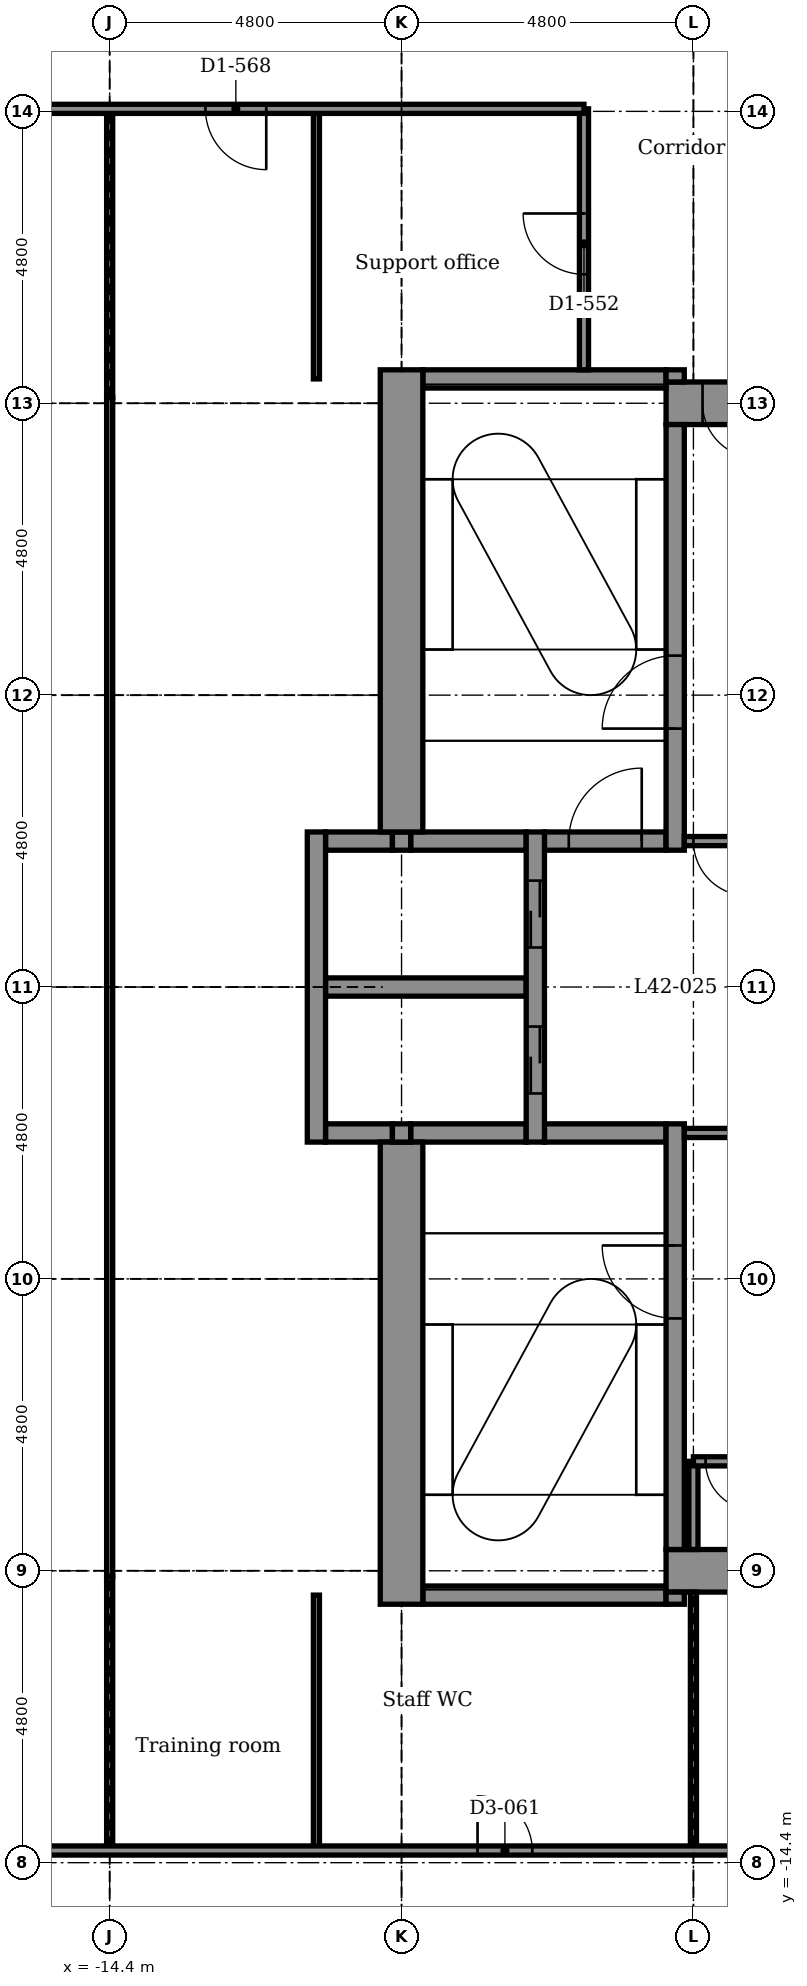
"""IFC4 building model, lengths in metres.
Left out: names, types, materials, properties, quantities, classifications, styles, units other than length and angle.
Written with IfcOpenShell. Run it as: python <this file> out.ifc"""

import sys

from ifc_helpers import new_model, si_unit, direction, frame, frame_2d, origin, place, context, subcontext, project, spatial, rectangle, extrude, element, fill, save


model = new_model("IFC4")
c1 = context("Model", 3, precision=1e-05, world=origin(), true_north=direction((0.0, 1.0)))
c2 = subcontext(c1, "Body", "Model", "MODEL_VIEW")
j1 = project(units=[si_unit("LENGTHUNIT", "METRE"), si_unit("PLANEANGLEUNIT", "RADIAN")], contexts=[c1])
p1 = place(None, origin())
s1 = spatial("IfcSite", under=j1, at=p1, CompositionType="ELEMENT")
p2 = place(p1, origin())
s2 = spatial("IfcBuilding", under=s1, at=p2, CompositionType="ELEMENT")
p3 = place(p2, frame((0.0, 0.0, 197.3)))
s3 = spatial("IfcBuildingStorey", under=s2, at=p3, CompositionType="ELEMENT", Elevation=197.3)
p4 = place(p3, frame((-9.25, -10.0, -0.15), z_axis=(0.0, 0.0, 1.0), x_axis=(1.0, 0.0, 0.0)))
e1 = element("IfcWall", 1, at=p4, inside=s3, PredefinedType="STANDARD", context=c2, shape_type="SweptSolid", body=[
    extrude(rectangle(XDim=4.0, YDim=0.3, at=frame_2d((2.0, 0.0))), origin(), (0.0, 0.0, 1.0), 3.9),
])
p5 = place(p3, frame((-5.25, -9.6, -0.15), z_axis=(0.0, 0.0, 1.0), x_axis=(1.0, 0.0, 0.0)))
e2 = element("IfcWall", 2, at=p5, inside=s3, PredefinedType="SHEAR", context=c2, shape_type="SweptSolid", body=[
    extrude(rectangle(XDim=10.2, YDim=0.7, at=frame_2d((5.1, 0.0))), origin(), (0.0, 0.0, 1.0), 3.9),
])
p6 = place(p5, frame((9.0, 0.0, 0.15)))
e3 = element("IfcOpeningElement", 3, at=p6, cuts=e2, PredefinedType="OPENING", context=c2, shape_type="SweptSolid", body=[
    extrude(rectangle(XDim=0.9, YDim=2.1, at=frame_2d((0.45, 1.05))), frame((0.0, 0.36, 0.0), z_axis=(0.0, -1.0, 0.0), x_axis=(1.0, 0.0, 0.0)), (0.0, 0.0, 1.0), 0.72),
])
p7 = place(p3, frame((-10.85, -2.4, -0.15), z_axis=(0.0, 0.0, 1.0), x_axis=(1.0, 0.0, 0.0)))
e4 = element("IfcWall", 4, at=p7, inside=s3, PredefinedType="STANDARD", context=c2, shape_type="SweptSolid", body=[
    extrude(rectangle(XDim=1.1, YDim=0.3, at=frame_2d((0.55, 0.0))), origin(), (0.0, 0.0, 1.0), 3.9),
])
p8 = place(p3, frame((-9.45, -2.4, -0.15), z_axis=(0.0, 0.0, 1.0), x_axis=(1.0, 0.0, 0.0)))
e5 = element("IfcWall", 5, at=p8, inside=s3, PredefinedType="STANDARD", context=c2, shape_type="SweptSolid", body=[
    extrude(rectangle(XDim=1.9, YDim=0.3, at=frame_2d((0.95, 0.0))), origin(), (0.0, 0.0, 1.0), 3.9),
])
p9 = place(p3, frame((-7.25, -2.4, -0.15), z_axis=(0.0, 0.0, 1.0), x_axis=(1.0, 0.0, 0.0)))
e6 = element("IfcWall", 6, at=p9, inside=s3, PredefinedType="STANDARD", context=c2, shape_type="SweptSolid", body=[
    extrude(rectangle(XDim=2.0, YDim=0.3, at=frame_2d((1.0, 0.0))), origin(), (0.0, 0.0, 1.0), 3.9),
])
p10 = place(p3, frame((-10.85, 0.0, -0.15), z_axis=(0.0, 0.0, 1.0), x_axis=(1.0, 0.0, 0.0)))
e7 = element("IfcWall", 7, at=p10, inside=s3, PredefinedType="STANDARD", context=c2, shape_type="SweptSolid", body=[
    extrude(rectangle(XDim=3.3, YDim=0.3, at=frame_2d((1.65, 0.0))), origin(), (0.0, 0.0, 1.0), 3.9),
])
p11 = place(p3, frame((-10.85, 2.4, -0.15), z_axis=(0.0, 0.0, 1.0), x_axis=(1.0, 0.0, 0.0)))
e8 = element("IfcWall", 8, at=p11, inside=s3, PredefinedType="STANDARD", context=c2, shape_type="SweptSolid", body=[
    extrude(rectangle(XDim=1.1, YDim=0.3, at=frame_2d((0.55, 0.0))), origin(), (0.0, 0.0, 1.0), 3.9),
])
p12 = place(p3, frame((-9.45, 2.4, -0.15), z_axis=(0.0, 0.0, 1.0), x_axis=(1.0, 0.0, 0.0)))
e9 = element("IfcWall", 9, at=p12, inside=s3, PredefinedType="STANDARD", context=c2, shape_type="SweptSolid", body=[
    extrude(rectangle(XDim=1.9, YDim=0.3, at=frame_2d((0.95, 0.0))), origin(), (0.0, 0.0, 1.0), 3.9),
])
p13 = place(p3, frame((-7.25, 2.4, -0.15), z_axis=(0.0, 0.0, 1.0), x_axis=(1.0, 0.0, 0.0)))
e10 = element("IfcWall", 10, at=p13, inside=s3, PredefinedType="STANDARD", context=c2, shape_type="SweptSolid", body=[
    extrude(rectangle(XDim=2.0, YDim=0.3, at=frame_2d((1.0, 0.0))), origin(), (0.0, 0.0, 1.0), 3.9),
])
p14 = place(p13, frame((0.4, 0.0, 0.15)))
e11 = element("IfcOpeningElement", 11, at=p14, cuts=e10, PredefinedType="OPENING", context=c2, shape_type="SweptSolid", body=[
    extrude(rectangle(XDim=1.2, YDim=2.1, at=frame_2d((0.6, 1.05))), frame((0.0, 0.16, 0.0), z_axis=(0.0, -1.0, 0.0), x_axis=(1.0, 0.0, 0.0)), (0.0, 0.0, 1.0), 0.32),
])
p15 = place(p3, frame((-5.25, 9.6, -0.15), z_axis=(0.0, 0.0, 1.0), x_axis=(1.0, 0.0, 0.0)))
e12 = element("IfcWall", 12, at=p15, inside=s3, PredefinedType="SHEAR", context=c2, shape_type="SweptSolid", body=[
    extrude(rectangle(XDim=14.5, YDim=0.7, at=frame_2d((7.25, 0.0))), origin(), (0.0, 0.0, 1.0), 3.9),
])
p16 = place(p15, frame((0.6, 0.0, 0.15)))
e13 = element("IfcOpeningElement", 13, at=p16, cuts=e12, PredefinedType="OPENING", context=c2, shape_type="SweptSolid", body=[
    extrude(rectangle(XDim=0.9, YDim=2.1, at=frame_2d((0.45, 1.05))), frame((0.0, 0.36, 0.0), z_axis=(0.0, -1.0, 0.0), x_axis=(1.0, 0.0, 0.0)), (0.0, 0.0, 1.0), 0.72),
])
p17 = place(p3, frame((-9.25, 10.0, -0.15), z_axis=(0.0, 0.0, 1.0), x_axis=(1.0, 0.0, 0.0)))
e14 = element("IfcWall", 14, at=p17, inside=s3, PredefinedType="STANDARD", context=c2, shape_type="SweptSolid", body=[
    extrude(rectangle(XDim=4.0, YDim=0.3, at=frame_2d((2.0, 0.0))), origin(), (0.0, 0.0, 1.0), 3.9),
])
p18 = place(p3, frame((-11.0, -2.55, -0.15), z_axis=(0.0, 0.0, 1.0), x_axis=(0.0, 1.0, 0.0)))
e15 = element("IfcWall", 15, at=p18, inside=s3, PredefinedType="STANDARD", context=c2, shape_type="SweptSolid", body=[
    extrude(rectangle(XDim=5.1, YDim=0.3, at=frame_2d((2.55, 0.0))), origin(), (0.0, 0.0, 1.0), 3.9),
])
p19 = place(p3, frame((-9.6, -10.15, -0.15), z_axis=(0.0, 0.0, 1.0), x_axis=(0.0, 1.0, 0.0)))
e16 = element("IfcWall", 16, at=p19, inside=s3, PredefinedType="SHEAR", context=c2, shape_type="SweptSolid", body=[
    extrude(rectangle(XDim=7.6, YDim=0.7, at=frame_2d((3.8, 0.0))), origin(), (0.0, 0.0, 1.0), 3.9),
])
for number, where, z_axis, x_axis in (
    (17, (-9.6, -2.55, -0.15), (0.0, 0.0, 1.0), (0.0, 1.0, 0.0)),
    (18, (-9.6, 2.25, -0.15), (0.0, 0.0, 1.0), (0.0, 1.0, 0.0)),
):
    element("IfcWall", number, at=place(p3, frame(where, z_axis=z_axis, x_axis=x_axis)), inside=s3, PredefinedType="STANDARD", context=c2, shape_type="SweptSolid", body=[
        extrude(rectangle(XDim=0.3, YDim=0.3, at=frame_2d((0.15, 0.0))), origin(), (0.0, 0.0, 1.0), 3.9),
    ])
p20 = place(p3, frame((-9.6, 2.55, -0.15), z_axis=(0.0, 0.0, 1.0), x_axis=(0.0, 1.0, 0.0)))
e19 = element("IfcWall", 19, at=p20, inside=s3, PredefinedType="SHEAR", context=c2, shape_type="SweptSolid", body=[
    extrude(rectangle(XDim=7.6, YDim=0.7, at=frame_2d((3.8, 0.0))), origin(), (0.0, 0.0, 1.0), 3.9),
])
p21 = place(p3, frame((-7.4, -2.55, -0.15), z_axis=(0.0, 0.0, 1.0), x_axis=(0.0, 1.0, 0.0)))
e20 = element("IfcWall", 20, at=p21, inside=s3, PredefinedType="STANDARD", context=c2, shape_type="SweptSolid", body=[
    extrude(rectangle(XDim=5.1, YDim=0.3, at=frame_2d((2.55, 0.0))), origin(), (0.0, 0.0, 1.0), 3.9),
])
p22 = place(p21, frame((0.8, 0.0, 0.15)))
e21 = element("IfcOpeningElement", 21, at=p22, cuts=e20, PredefinedType="OPENING", context=c2, shape_type="SweptSolid", body=[
    extrude(rectangle(XDim=1.1, YDim=2.1, at=frame_2d((0.55, 1.05))), frame((0.0, 0.16, 0.0), z_axis=(0.0, -1.0, 0.0), x_axis=(1.0, 0.0, 0.0)), (0.0, 0.0, 1.0), 0.32),
])
p23 = place(p21, frame((3.2, 0.0, 0.15)))
e22 = element("IfcOpeningElement", 22, at=p23, cuts=e20, PredefinedType="OPENING", context=c2, shape_type="SweptSolid", body=[
    extrude(rectangle(XDim=1.1, YDim=2.1, at=frame_2d((0.55, 1.05))), frame((0.0, 0.16, 0.0), z_axis=(0.0, -1.0, 0.0), x_axis=(1.0, 0.0, 0.0)), (0.0, 0.0, 1.0), 0.32),
])
p24 = place(p3, frame((-5.1, -10.15, -0.15), z_axis=(0.0, 0.0, 1.0), x_axis=(0.0, 1.0, 0.0)))
e23 = element("IfcWall", 23, at=p24, inside=s3, PredefinedType="STANDARD", context=c2, shape_type="SweptSolid", body=[
    extrude(rectangle(XDim=0.2, YDim=0.3, at=frame_2d((0.1, 0.0))), origin(), (0.0, 0.0, 1.0), 3.9),
])
p25 = place(p3, frame((-5.1, -9.25, -0.15), z_axis=(0.0, 0.0, 1.0), x_axis=(0.0, 1.0, 0.0)))
e24 = element("IfcWall", 24, at=p25, inside=s3, PredefinedType="STANDARD", context=c2, shape_type="SweptSolid", body=[
    extrude(rectangle(XDim=7.0, YDim=0.3, at=frame_2d((3.5, 0.0))), origin(), (0.0, 0.0, 1.0), 3.9),
])
p26 = place(p25, frame((3.8, 0.0, 0.15)))
e25 = element("IfcOpeningElement", 25, at=p26, cuts=e24, PredefinedType="OPENING", context=c2, shape_type="SweptSolid", body=[
    extrude(rectangle(XDim=1.2, YDim=2.1, at=frame_2d((0.6, 1.05))), frame((0.0, 0.16, 0.0), z_axis=(0.0, -1.0, 0.0), x_axis=(1.0, 0.0, 0.0)), (0.0, 0.0, 1.0), 0.32),
])
p27 = place(p3, frame((-5.1, 2.25, -0.15), z_axis=(0.0, 0.0, 1.0), x_axis=(0.0, 1.0, 0.0)))
e26 = element("IfcWall", 26, at=p27, inside=s3, PredefinedType="STANDARD", context=c2, shape_type="SweptSolid", body=[
    extrude(rectangle(XDim=7.0, YDim=0.3, at=frame_2d((3.5, 0.0))), origin(), (0.0, 0.0, 1.0), 3.9),
])
p28 = place(p27, frame((2.0, 0.0, 0.15)))
e27 = element("IfcOpeningElement", 27, at=p28, cuts=e26, PredefinedType="OPENING", context=c2, shape_type="SweptSolid", body=[
    extrude(rectangle(XDim=1.2, YDim=2.1, at=frame_2d((0.6, 1.05))), frame((0.0, 0.16, 0.0), z_axis=(0.0, -1.0, 0.0), x_axis=(1.0, 0.0, 0.0)), (0.0, 0.0, 1.0), 0.32),
])
p29 = place(p3, frame((-5.1, 9.95, -0.15), z_axis=(0.0, 0.0, 1.0), x_axis=(0.0, 1.0, 0.0)))
e28 = element("IfcWall", 28, at=p29, inside=s3, PredefinedType="STANDARD", context=c2, shape_type="SweptSolid", body=[
    extrude(rectangle(XDim=0.2, YDim=0.3, at=frame_2d((0.1, 0.0))), origin(), (0.0, 0.0, 1.0), 3.9),
])
p30 = place(p3, frame((-4.8, -14.2, 0.0), z_axis=(0.0, 0.0, 1.0), x_axis=(0.0, 1.0, 0.0)))
e29 = element("IfcWall", 29, at=p30, inside=s3, PredefinedType="PARTITIONING", context=c2, shape_type="SweptSolid", body=[
    extrude(rectangle(XDim=4.25, YDim=0.1, at=frame_2d((2.125, 0.0))), origin(), (0.0, 0.0, 1.0), 3.066),
])
p31 = place(p3, frame((-4.8, -9.25, 0.0), z_axis=(0.0, 0.0, 1.0), x_axis=(0.0, 1.0, 0.0)))
e30 = element("IfcWall", 30, at=p31, inside=s3, PredefinedType="PARTITIONING", context=c2, shape_type="SweptSolid", body=[
    extrude(rectangle(XDim=1.45, YDim=0.15, at=frame_2d((0.725, 0.0))), origin(), (0.0, 0.0, 1.0), 3.75),
])
p32 = place(p3, frame((-6.6, 10.15, 0.0), z_axis=(0.0, 0.0, 1.0), x_axis=(0.0, 1.0, 0.0)))
e31 = element("IfcWall", 31, at=p32, inside=s3, PredefinedType="PARTITIONING", context=c2, shape_type="SweptSolid", body=[
    extrude(rectangle(XDim=4.292, YDim=0.15, at=frame_2d((2.146, 0.0))), origin(), (0.0, 0.0, 1.0), 3.75),
])
p33 = place(p32, frame((1.571, 0.0, 0.0)))
e32 = element("IfcOpeningElement", 32, at=p33, cuts=e31, PredefinedType="OPENING", context=c2, shape_type="SweptSolid", body=[
    extrude(rectangle(XDim=1.0, YDim=2.1, at=frame_2d((0.5, 1.05))), frame((0.0, 0.085, 0.0), z_axis=(0.0, -1.0, 0.0), x_axis=(1.0, 0.0, 0.0)), (0.0, 0.0, 1.0), 0.17),
])
p34 = place(p3, frame((-11.0, -14.2, 0.0), z_axis=(0.0, 0.0, 1.0), x_axis=(0.0, 1.0, 0.0)))
e33 = element("IfcWall", 33, at=p34, inside=s3, PredefinedType="PARTITIONING", context=c2, shape_type="SweptSolid", body=[
    extrude(rectangle(XDim=4.2, YDim=0.1, at=frame_2d((2.1, 0.0))), origin(), (0.0, 0.0, 1.0), 3.75),
])
p35 = place(p3, frame((-11.0, 10.0, 0.0), z_axis=(0.0, 0.0, 1.0), x_axis=(0.0, 1.0, 0.0)))
e34 = element("IfcWall", 34, at=p35, inside=s3, PredefinedType="PARTITIONING", context=c2, shape_type="SweptSolid", body=[
    extrude(rectangle(XDim=4.441, YDim=0.1, at=frame_2d((2.221, 0.0))), origin(), (0.0, 0.0, 1.0), 3.75),
])
p36 = place(p3, frame((-14.4, -9.694, 0.0), z_axis=(0.0, 0.0, 1.0), x_axis=(0.0, 1.0, 0.0)))
e35 = element("IfcWall", 35, at=p36, inside=s3, PredefinedType="PARTITIONING", context=c2, shape_type="SweptSolid", body=[
    extrude(rectangle(XDim=19.387, YDim=0.1, at=frame_2d((9.694, 0.0))), origin(), (0.0, 0.0, 1.0), 3.75),
])
p37 = place(p3, frame((-14.4, -14.2, 0.0), z_axis=(0.0, 0.0, 1.0), x_axis=(0.0, 1.0, 0.0)))
e36 = element("IfcWall", 36, at=p37, inside=s3, PredefinedType="PARTITIONING", context=c2, shape_type="SweptSolid", body=[
    extrude(rectangle(XDim=4.506, YDim=0.1, at=frame_2d((2.253, 0.0))), origin(), (0.0, 0.0, 1.0), 3.066),
])
p38 = place(p3, frame((-14.4, 9.694, 0.0), z_axis=(0.0, 0.0, 1.0), x_axis=(0.0, 1.0, 0.0)))
e37 = element("IfcWall", 37, at=p38, inside=s3, PredefinedType="PARTITIONING", context=c2, shape_type="SweptSolid", body=[
    extrude(rectangle(XDim=4.748, YDim=0.1, at=frame_2d((2.374, 0.0))), origin(), (0.0, 0.0, 1.0), 3.066),
])
p39 = place(p3, frame((-16.93, -14.2, 0.0), z_axis=(0.0, 0.0, 1.0), x_axis=(1.0, 0.0, 0.0)))
e38 = element("IfcWall", 38, at=p39, inside=s3, PredefinedType="PARTITIONING", context=c2, shape_type="SweptSolid", body=[
    extrude(rectangle(XDim=19.93, YDim=0.15, at=frame_2d((9.965, 0.0))), origin(), (0.0, 0.0, 1.0), 3.75),
])
p40 = place(p39, frame((8.58, 0.0, 0.0)))
e39 = element("IfcOpeningElement", 39, at=p40, cuts=e38, PredefinedType="OPENING", context=c2, shape_type="SweptSolid", body=[
    extrude(rectangle(XDim=0.9, YDim=2.1, at=frame_2d((0.45, 1.05))), frame((0.0, 0.085, 0.0), z_axis=(0.0, -1.0, 0.0), x_axis=(1.0, 0.0, 0.0)), (0.0, 0.0, 1.0), 0.17),
])
p41 = place(p39, frame((14.08, 0.0, 0.0)))
e40 = element("IfcOpeningElement", 40, at=p41, cuts=e38, PredefinedType="OPENING", context=c2, shape_type="SweptSolid", body=[
    extrude(rectangle(XDim=0.9, YDim=2.1, at=frame_2d((0.45, 1.05))), frame((0.0, 0.085, 0.0), z_axis=(0.0, -1.0, 0.0), x_axis=(1.0, 0.0, 0.0)), (0.0, 0.0, 1.0), 0.17),
])
p42 = place(p3, frame((-4.8, -7.8, 0.0), z_axis=(0.0, 0.0, 1.0), x_axis=(1.0, 0.0, 0.0)))
e41 = element("IfcWall", 41, at=p42, inside=s3, PredefinedType="PARTITIONING", context=c2, shape_type="SweptSolid", body=[
    extrude(rectangle(XDim=1.05, YDim=0.15, at=frame_2d((0.525, 0.0))), origin(), (0.0, 0.0, 1.0), 3.75),
])
p43 = place(p42, frame((0.2, 0.0, 0.0)))
e42 = element("IfcOpeningElement", 42, at=p43, cuts=e41, PredefinedType="OPENING", context=c2, shape_type="SweptSolid", body=[
    extrude(rectangle(XDim=0.8, YDim=2.1, at=frame_2d((0.4, 1.05))), frame((0.0, 0.085, 0.0), z_axis=(0.0, -1.0, 0.0), x_axis=(1.0, 0.0, 0.0)), (0.0, 0.0, 1.0), 0.17),
])
p44 = place(p3, frame((-18.592, 14.441, 0.0), z_axis=(0.0, 0.0, 1.0), x_axis=(1.0, 0.0, 0.0)))
e43 = element("IfcWall", 43, at=p44, inside=s3, PredefinedType="PARTITIONING", context=c2, shape_type="SweptSolid", body=[
    extrude(rectangle(XDim=11.991, YDim=0.15, at=frame_2d((5.996, 0.0))), origin(), (0.0, 0.0, 1.0), 3.75),
])
p45 = place(p44, frame((5.767, 0.0, 0.0)))
e44 = element("IfcOpeningElement", 44, at=p45, cuts=e43, PredefinedType="OPENING", context=c2, shape_type="SweptSolid", body=[
    extrude(rectangle(XDim=1.0, YDim=2.1, at=frame_2d((0.5, 1.05))), frame((0.0, 0.085, 0.0), z_axis=(0.0, -1.0, 0.0), x_axis=(1.0, 0.0, 0.0)), (0.0, 0.0, 1.0), 0.17),
])
p46 = place(p3, frame((-4.95, 2.4, 0.0), z_axis=(0.0, 0.0, 1.0), x_axis=(1.0, 0.0, 0.0)))
e45 = element("IfcWall", 45, at=p46, inside=s3, PredefinedType="PARTITIONING", context=c2, shape_type="SweptSolid", body=[
    extrude(rectangle(XDim=1.2, YDim=0.15, at=frame_2d((0.6, 0.0))), origin(), (0.0, 0.0, 1.0), 3.75),
])
p47 = place(p46, frame((0.15, 0.0, 0.0)))
e46 = element("IfcOpeningElement", 46, at=p47, cuts=e45, PredefinedType="OPENING", context=c2, shape_type="SweptSolid", body=[
    extrude(rectangle(XDim=0.9, YDim=2.1, at=frame_2d((0.45, 1.05))), frame((0.0, 0.085, 0.0), z_axis=(0.0, -1.0, 0.0), x_axis=(1.0, 0.0, 0.0)), (0.0, 0.0, 1.0), 0.17),
])
p48 = place(p3, frame((-4.95, -2.4, 0.0), z_axis=(0.0, 0.0, 1.0), x_axis=(1.0, 0.0, 0.0)))
e47 = element("IfcWall", 47, at=p48, inside=s3, PredefinedType="PARTITIONING", context=c2, shape_type="SweptSolid", body=[
    extrude(rectangle(XDim=1.2, YDim=0.15, at=frame_2d((0.6, 0.0))), origin(), (0.0, 0.0, 1.0), 3.75),
])
p49 = place(p43, frame((0.8, 0.0, 0.0), z_axis=(0.0, 0.0, 1.0), x_axis=(-1.0, 0.0, 0.0)))
e48 = element("IfcDoor", 48, at=p49, inside=s3, OperationType="SINGLE_SWING_RIGHT", PredefinedType="DOOR", context=c2, shape_type="SweptSolid", body=[
    extrude(rectangle(XDim=0.8, YDim=2.1, at=frame_2d((0.4, 1.05))), frame((0.0, 0.025, 0.0), z_axis=(0.0, -1.0, 0.0), x_axis=(1.0, 0.0, 0.0)), (0.0, 0.0, 1.0), 0.05),
])
fill(e42, e48)
p50 = place(p33, origin())
e49 = element("IfcDoor", 49, at=p50, inside=s3, OperationType="SINGLE_SWING_RIGHT", PredefinedType="DOOR", context=c2, shape_type="SweptSolid", body=[
    extrude(rectangle(XDim=1.0, YDim=2.1, at=frame_2d((0.5, 1.05))), frame((0.0, 0.025, 0.0), z_axis=(0.0, -1.0, 0.0), x_axis=(1.0, 0.0, 0.0)), (0.0, 0.0, 1.0), 0.05),
])
fill(e32, e49)
p51 = place(p40, origin())
e50 = element("IfcDoor", 50, at=p51, inside=s3, OperationType="SINGLE_SWING_LEFT", PredefinedType="DOOR", context=c2, shape_type="SweptSolid", body=[
    extrude(rectangle(XDim=0.9, YDim=2.1, at=frame_2d((0.45, 1.05))), frame((0.0, 0.025, 0.0), z_axis=(0.0, -1.0, 0.0), x_axis=(1.0, 0.0, 0.0)), (0.0, 0.0, 1.0), 0.05),
])
fill(e39, e50)
p52 = place(p45, frame((1.0, 0.0, 0.0), z_axis=(0.0, 0.0, 1.0), x_axis=(-1.0, 0.0, 0.0)))
e51 = element("IfcDoor", 51, at=p52, inside=s3, OperationType="SINGLE_SWING_RIGHT", PredefinedType="DOOR", context=c2, shape_type="SweptSolid", body=[
    extrude(rectangle(XDim=1.0, YDim=2.1, at=frame_2d((0.5, 1.05))), frame((0.0, 0.025, 0.0), z_axis=(0.0, -1.0, 0.0), x_axis=(1.0, 0.0, 0.0)), (0.0, 0.0, 1.0), 0.05),
])
fill(e44, e51)
p53 = place(p22, origin())
e52 = element("IfcDoor", 52, at=p53, inside=s3, OperationType="DOUBLE_DOOR_SLIDING", PredefinedType="DOOR", context=c2, shape_type="SweptSolid", body=[
    extrude(rectangle(XDim=1.1, YDim=2.1, at=frame_2d((0.55, 1.05))), frame((0.0, 0.025, 0.0), z_axis=(0.0, -1.0, 0.0), x_axis=(1.0, 0.0, 0.0)), (0.0, 0.0, 1.0), 0.05),
])
fill(e21, e52)
p54 = place(p23, origin())
e53 = element("IfcDoor", 53, at=p54, inside=s3, OperationType="DOUBLE_DOOR_SLIDING", PredefinedType="DOOR", context=c2, shape_type="SweptSolid", body=[
    extrude(rectangle(XDim=1.1, YDim=2.1, at=frame_2d((0.55, 1.05))), frame((0.0, 0.025, 0.0), z_axis=(0.0, -1.0, 0.0), x_axis=(1.0, 0.0, 0.0)), (0.0, 0.0, 1.0), 0.05),
])
fill(e22, e53)
p55 = place(p28, origin())
e54 = element("IfcDoor", 54, at=p55, inside=s3, OperationType="SINGLE_SWING_LEFT", PredefinedType="DOOR", context=c2, shape_type="SweptSolid", body=[
    extrude(rectangle(XDim=1.2, YDim=2.1, at=frame_2d((0.6, 1.05))), frame((0.0, 0.025, 0.0), z_axis=(0.0, -1.0, 0.0), x_axis=(1.0, 0.0, 0.0)), (0.0, 0.0, 1.0), 0.05),
])
fill(e27, e54)
p56 = place(p26, origin())
e55 = element("IfcDoor", 55, at=p56, inside=s3, OperationType="SINGLE_SWING_RIGHT", PredefinedType="DOOR", context=c2, shape_type="SweptSolid", body=[
    extrude(rectangle(XDim=1.2, YDim=2.1, at=frame_2d((0.6, 1.05))), frame((0.0, 0.025, 0.0), z_axis=(0.0, -1.0, 0.0), x_axis=(1.0, 0.0, 0.0)), (0.0, 0.0, 1.0), 0.05),
])
fill(e25, e55)
p57 = place(p16, frame((0.9, 0.0, 0.0), z_axis=(0.0, 0.0, 1.0), x_axis=(-1.0, 0.0, 0.0)))
e56 = element("IfcDoor", 56, at=p57, inside=s3, OperationType="SINGLE_SWING_RIGHT", PredefinedType="DOOR", context=c2, shape_type="SweptSolid", body=[
    extrude(rectangle(XDim=0.9, YDim=2.1, at=frame_2d((0.45, 1.05))), frame((0.0, 0.025, 0.0), z_axis=(0.0, -1.0, 0.0), x_axis=(1.0, 0.0, 0.0)), (0.0, 0.0, 1.0), 0.05),
])
fill(e13, e56)
p58 = place(p47, frame((0.9, 0.0, 0.0), z_axis=(0.0, 0.0, 1.0), x_axis=(-1.0, 0.0, 0.0)))
e57 = element("IfcDoor", 57, at=p58, inside=s3, OperationType="SINGLE_SWING_RIGHT", PredefinedType="DOOR", context=c2, shape_type="SweptSolid", body=[
    extrude(rectangle(XDim=0.9, YDim=2.1, at=frame_2d((0.45, 1.05))), frame((0.0, 0.025, 0.0), z_axis=(0.0, -1.0, 0.0), x_axis=(1.0, 0.0, 0.0)), (0.0, 0.0, 1.0), 0.05),
])
fill(e46, e57)
p59 = place(p14, origin())
e58 = element("IfcDoor", 58, at=p59, inside=s3, OperationType="SINGLE_SWING_RIGHT", PredefinedType="DOOR", context=c2, shape_type="SweptSolid", body=[
    extrude(rectangle(XDim=1.2, YDim=2.1, at=frame_2d((0.6, 1.05))), frame((0.0, 0.025, 0.0), z_axis=(0.0, -1.0, 0.0), x_axis=(1.0, 0.0, 0.0)), (0.0, 0.0, 1.0), 0.05),
])
fill(e11, e58)
save(model, sys.argv[1])
